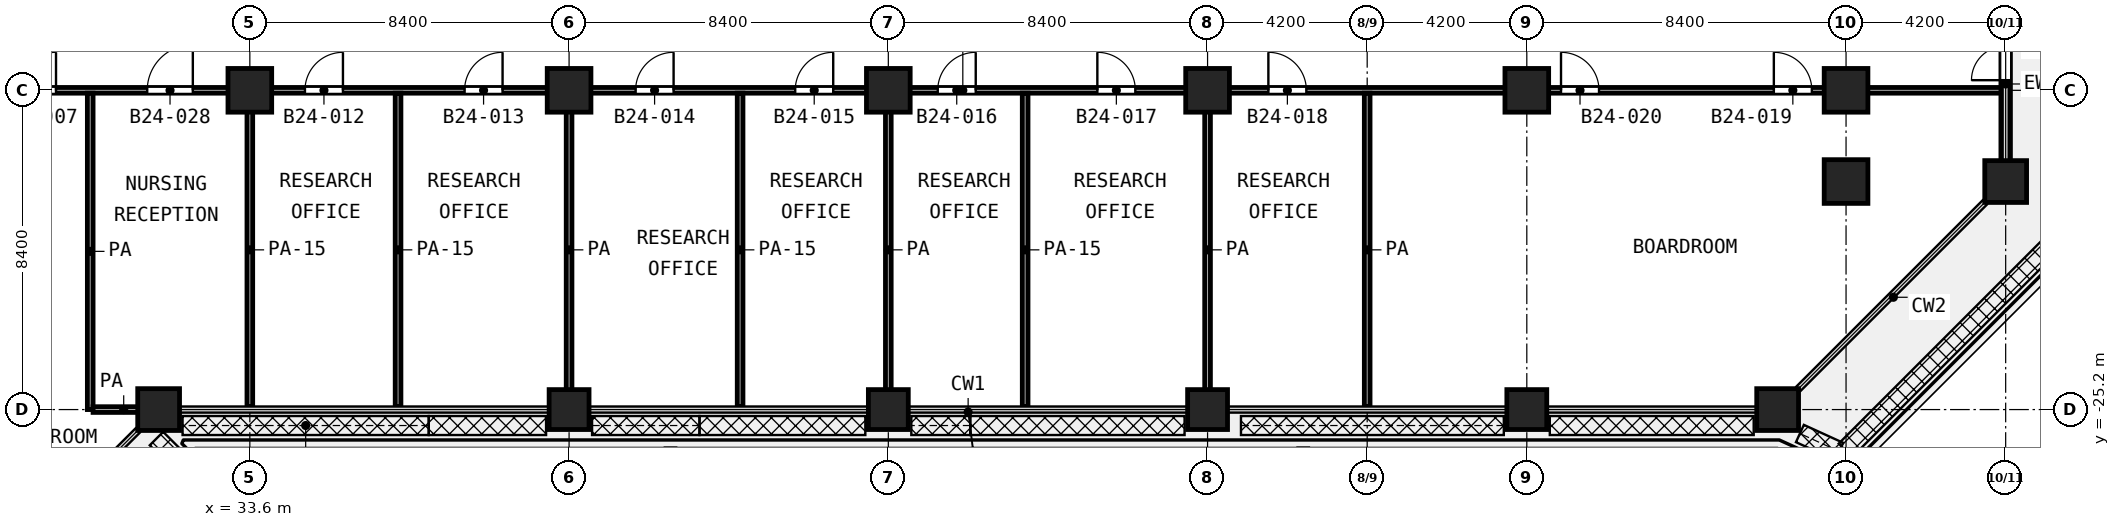
"""IFC4 building model, lengths in metres.
Left out: names, types, materials, properties, quantities, classifications, styles, units other than length and angle.
Written with IfcOpenShell. Run it as: python <this file> out.ifc"""

import sys

from ifc_helpers import new_model, si_unit, direction, frame, frame_2d, origin, origin_2d, place, context, subcontext, project, spatial, rectangle, extrude, element, fill, save


model = new_model("IFC4")
c1 = context("Model", 3, precision=1e-05, world=origin(), true_north=direction((0.0, 1.0)))
c2 = subcontext(c1, "Body", "Model", "MODEL_VIEW")
j1 = project(units=[si_unit("LENGTHUNIT", "METRE"), si_unit("PLANEANGLEUNIT", "RADIAN")], contexts=[c1])
p1 = place(None, origin())
s1 = spatial("IfcSite", under=j1, at=p1, CompositionType="ELEMENT")
p2 = place(p1, origin())
s2 = spatial("IfcBuilding", under=s1, at=p2, CompositionType="ELEMENT")
p3 = place(p2, frame((0.0, 0.0, 107.2)))
s3 = spatial("IfcBuildingStorey", under=s2, at=p3, CompositionType="ELEMENT", Elevation=107.2)
for number, where, z_axis, x_axis in (
    (1, (33.6, -16.8, 0.0), (0.0, 0.0, 1.0), (1.0, 0.0, 0.0)),
    (2, (42.0, -16.8, 0.0), (0.0, 0.0, 1.0), (1.0, 0.0, 0.0)),
    (3, (50.4, -16.8, 0.0), (0.0, 0.0, 1.0), (1.0, 0.0, 0.0)),
    (4, (58.8, -16.8, 0.0), (0.0, 0.0, 1.0), (1.0, 0.0, 0.0)),
    (5, (67.2, -16.8, 0.0), (0.0, 0.0, 1.0), (1.0, 0.0, 0.0)),
    (6, (75.6, -16.8, 0.0), (0.0, 0.0, 1.0), (1.0, 0.0, 0.0)),
    (7, (75.6, -19.2, 0.0), (0.0, 0.0, 1.0), (1.0, 0.0, 0.0)),
):
    element("IfcColumn", number, at=place(p3, frame(where, z_axis=z_axis, x_axis=x_axis)), inside=s3, PredefinedType="COLUMN", context=c2, shape_type="SweptSolid", body=[
        extrude(rectangle(XDim=1.15, YDim=1.15, at=origin_2d()), origin(), (0.0, 0.0, 1.0), 4.2),
    ])
for number, where, z_axis, x_axis in (
    (8, (79.8, -19.2, 0.0), (0.0, 0.0, 1.0), (1.0, 0.0, 0.0)),
    (9, (31.2, -25.2, 0.0), (0.0, 0.0, 1.0), (1.0, 0.0, 0.0)),
):
    element("IfcColumn", number, at=place(p3, frame(where, z_axis=z_axis, x_axis=x_axis)), inside=s3, PredefinedType="COLUMN", context=c2, shape_type="SweptSolid", body=[
        extrude(rectangle(XDim=1.1, YDim=1.1, at=origin_2d()), origin(), (0.0, 0.0, 1.0), 4.2),
    ])
for number, where, z_axis, x_axis in (
    (10, (42.0, -25.2, 0.0), (0.0, 0.0, 1.0), (1.0, 0.0, 0.0)),
    (11, (50.4, -25.2, 0.0), (0.0, 0.0, 1.0), (1.0, 0.0, 0.0)),
    (12, (58.8, -25.2, 0.0), (0.0, 0.0, 1.0), (1.0, 0.0, 0.0)),
    (13, (67.2, -25.2, 0.0), (0.0, 0.0, 1.0), (1.0, 0.0, 0.0)),
):
    element("IfcColumn", number, at=place(p3, frame(where, z_axis=z_axis, x_axis=x_axis)), inside=s3, PredefinedType="COLUMN", context=c2, shape_type="SweptSolid", body=[
        extrude(rectangle(XDim=1.05, YDim=1.05, at=origin_2d()), origin(), (0.0, 0.0, 1.0), 4.2),
    ])
p4 = place(p3, frame((73.8, -25.2, 0.0), z_axis=(0.0, 0.0, 1.0), x_axis=(1.0, 0.0, 0.0)))
e14 = element("IfcColumn", 14, at=p4, inside=s3, PredefinedType="COLUMN", context=c2, shape_type="SweptSolid", body=[
    extrude(rectangle(XDim=1.1, YDim=1.1, at=origin_2d()), origin(), (0.0, 0.0, 1.0), 4.2),
])
p5 = place(p3, frame((79.8, -18.65, 0.0), z_axis=(0.0, 0.0, 1.0), x_axis=(0.0, 1.0, 0.0)))
e15 = element("IfcWall", 15, at=p5, inside=s3, PredefinedType="SOLIDWALL", context=c2, shape_type="SweptSolid", body=[
    extrude(rectangle(XDim=4.033, YDim=0.25, at=frame_2d((2.017, 0.0))), origin(), (0.0, 0.0, 1.0), 3.48),
])
p6 = place(p5, frame((2.117, 0.0, 0.0)))
e16 = element("IfcOpeningElement", 16, at=p6, cuts=e15, PredefinedType="OPENING", context=c2, shape_type="SweptSolid", body=[
    extrude(rectangle(XDim=1.8, YDim=2.1, at=frame_2d((0.9, 1.05))), frame((0.0, 0.135, 0.0), z_axis=(0.0, -1.0, 0.0), x_axis=(1.0, 0.0, 0.0)), (0.0, 0.0, 1.0), 0.27),
])
p7 = place(p3, frame((29.475, -25.2, 0.0), z_axis=(0.0, 0.0, 1.0), x_axis=(1.0, 0.0, 0.0)))
e17 = element("IfcWall", 17, at=p7, inside=s3, PredefinedType="PARTITIONING", context=c2, shape_type="SweptSolid", body=[
    extrude(rectangle(XDim=1.612, YDim=0.15, at=frame_2d((0.806, 0.0))), origin(), (0.0, 0.0, 1.0), 3.6),
])
p8 = place(p3, frame((25.0, -16.8, 0.0), z_axis=(0.0, 0.0, 1.0), x_axis=(1.0, 0.0, 0.0)))
e18 = element("IfcWall", 18, at=p8, inside=s3, PredefinedType="PARTITIONING", context=c2, shape_type="SweptSolid", body=[
    extrude(rectangle(XDim=54.72, YDim=0.15, at=frame_2d((27.36, 0.0))), origin(), (0.0, 0.0, 1.0), 3.6),
])
p9 = place(p8, frame((2.5, 0.0, 0.0)))
e19 = element("IfcOpeningElement", 19, at=p9, cuts=e18, PredefinedType="OPENING", context=c2, shape_type="SweptSolid", body=[
    extrude(rectangle(XDim=1.0, YDim=2.1, at=frame_2d((0.5, 1.05))), frame((0.0, 0.085, 0.0), z_axis=(0.0, -1.0, 0.0), x_axis=(1.0, 0.0, 0.0)), (0.0, 0.0, 1.0), 0.17),
])
p10 = place(p8, frame((1.1, 0.0, 0.0)))
e20 = element("IfcOpeningElement", 20, at=p10, cuts=e18, PredefinedType="OPENING", context=c2, shape_type="SweptSolid", body=[
    extrude(rectangle(XDim=1.0, YDim=2.1, at=frame_2d((0.5, 1.05))), frame((0.0, 0.085, 0.0), z_axis=(0.0, -1.0, 0.0), x_axis=(1.0, 0.0, 0.0)), (0.0, 0.0, 1.0), 0.17),
])
p11 = place(p8, frame((5.9, 0.0, 0.0)))
e21 = element("IfcOpeningElement", 21, at=p11, cuts=e18, PredefinedType="OPENING", context=c2, shape_type="SweptSolid", body=[
    extrude(rectangle(XDim=1.2, YDim=2.1, at=frame_2d((0.6, 1.05))), frame((0.0, 0.085, 0.0), z_axis=(0.0, -1.0, 0.0), x_axis=(1.0, 0.0, 0.0)), (0.0, 0.0, 1.0), 0.17),
])
p12 = place(p8, frame((10.05, 0.0, 0.0)))
e22 = element("IfcOpeningElement", 22, at=p12, cuts=e18, PredefinedType="OPENING", context=c2, shape_type="SweptSolid", body=[
    extrude(rectangle(XDim=1.0, YDim=2.1, at=frame_2d((0.5, 1.05))), frame((0.0, 0.085, 0.0), z_axis=(0.0, -1.0, 0.0), x_axis=(1.0, 0.0, 0.0)), (0.0, 0.0, 1.0), 0.17),
])
p13 = place(p8, frame((14.25, 0.0, 0.0)))
e23 = element("IfcOpeningElement", 23, at=p13, cuts=e18, PredefinedType="OPENING", context=c2, shape_type="SweptSolid", body=[
    extrude(rectangle(XDim=1.0, YDim=2.1, at=frame_2d((0.5, 1.05))), frame((0.0, 0.085, 0.0), z_axis=(0.0, -1.0, 0.0), x_axis=(1.0, 0.0, 0.0)), (0.0, 0.0, 1.0), 0.17),
])
p14 = place(p8, frame((18.75, 0.0, 0.0)))
e24 = element("IfcOpeningElement", 24, at=p14, cuts=e18, PredefinedType="OPENING", context=c2, shape_type="SweptSolid", body=[
    extrude(rectangle(XDim=1.0, YDim=2.1, at=frame_2d((0.5, 1.05))), frame((0.0, 0.085, 0.0), z_axis=(0.0, -1.0, 0.0), x_axis=(1.0, 0.0, 0.0)), (0.0, 0.0, 1.0), 0.17),
])
p15 = place(p8, frame((22.95, 0.0, 0.0)))
e25 = element("IfcOpeningElement", 25, at=p15, cuts=e18, PredefinedType="OPENING", context=c2, shape_type="SweptSolid", body=[
    extrude(rectangle(XDim=1.0, YDim=2.1, at=frame_2d((0.5, 1.05))), frame((0.0, 0.085, 0.0), z_axis=(0.0, -1.0, 0.0), x_axis=(1.0, 0.0, 0.0)), (0.0, 0.0, 1.0), 0.17),
])
p16 = place(p8, frame((26.7, 0.0, 0.0)))
e26 = element("IfcOpeningElement", 26, at=p16, cuts=e18, PredefinedType="OPENING", context=c2, shape_type="SweptSolid", body=[
    extrude(rectangle(XDim=1.0, YDim=2.1, at=frame_2d((0.5, 1.05))), frame((0.0, 0.085, 0.0), z_axis=(0.0, -1.0, 0.0), x_axis=(1.0, 0.0, 0.0)), (0.0, 0.0, 1.0), 0.17),
])
p17 = place(p8, frame((30.9, 0.0, 0.0)))
e27 = element("IfcOpeningElement", 27, at=p17, cuts=e18, PredefinedType="OPENING", context=c2, shape_type="SweptSolid", body=[
    extrude(rectangle(XDim=1.0, YDim=2.1, at=frame_2d((0.5, 1.05))), frame((0.0, 0.085, 0.0), z_axis=(0.0, -1.0, 0.0), x_axis=(1.0, 0.0, 0.0)), (0.0, 0.0, 1.0), 0.17),
])
p18 = place(p8, frame((35.4, 0.0, 0.0)))
e28 = element("IfcOpeningElement", 28, at=p18, cuts=e18, PredefinedType="OPENING", context=c2, shape_type="SweptSolid", body=[
    extrude(rectangle(XDim=1.0, YDim=2.1, at=frame_2d((0.5, 1.05))), frame((0.0, 0.085, 0.0), z_axis=(0.0, -1.0, 0.0), x_axis=(1.0, 0.0, 0.0)), (0.0, 0.0, 1.0), 0.17),
])
p19 = place(p8, frame((48.7, 0.0, 0.0)))
e29 = element("IfcOpeningElement", 29, at=p19, cuts=e18, PredefinedType="OPENING", context=c2, shape_type="SweptSolid", body=[
    extrude(rectangle(XDim=1.0, YDim=2.1, at=frame_2d((0.5, 1.05))), frame((0.0, 0.085, 0.0), z_axis=(0.0, -1.0, 0.0), x_axis=(1.0, 0.0, 0.0)), (0.0, 0.0, 1.0), 0.17),
])
p20 = place(p8, frame((43.1, 0.0, 0.0)))
e30 = element("IfcOpeningElement", 30, at=p20, cuts=e18, PredefinedType="OPENING", context=c2, shape_type="SweptSolid", body=[
    extrude(rectangle(XDim=1.0, YDim=2.1, at=frame_2d((0.5, 1.05))), frame((0.0, 0.085, 0.0), z_axis=(0.0, -1.0, 0.0), x_axis=(1.0, 0.0, 0.0)), (0.0, 0.0, 1.0), 0.17),
])
p21 = place(p3, frame((29.4, -25.2, 0.0), z_axis=(0.0, 0.0, 1.0), x_axis=(0.0, 1.0, 0.0)))
e31 = element("IfcWall", 31, at=p21, inside=s3, PredefinedType="PARTITIONING", context=c2, shape_type="SweptSolid", body=[
    extrude(rectangle(XDim=8.325, YDim=0.15, at=frame_2d((4.163, 0.0))), origin(), (0.0, 0.0, 1.0), 3.6),
])
for number, where, z_axis, x_axis in (
    (32, (33.6, -25.12, 0.0), (0.0, 0.0, 1.0), (0.0, 1.0, 0.0)),
    (33, (37.5, -25.12, 0.0), (0.0, 0.0, 1.0), (0.0, 1.0, 0.0)),
):
    element("IfcWall", number, at=place(p3, frame(where, z_axis=z_axis, x_axis=x_axis)), inside=s3, PredefinedType="PARTITIONING", context=c2, shape_type="SweptSolid", body=[
        extrude(rectangle(XDim=8.245, YDim=0.15, at=frame_2d((4.123, 0.0))), origin(), (0.0, 0.0, 1.0), 2.7),
    ])
p22 = place(p3, frame((42.0, -25.12, 0.0), z_axis=(0.0, 0.0, 1.0), x_axis=(0.0, 1.0, 0.0)))
e34 = element("IfcWall", 34, at=p22, inside=s3, PredefinedType="PARTITIONING", context=c2, shape_type="SweptSolid", body=[
    extrude(rectangle(XDim=8.245, YDim=0.15, at=frame_2d((4.123, 0.0))), origin(), (0.0, 0.0, 1.0), 3.6),
])
p23 = place(p3, frame((46.5, -25.12, 0.0), z_axis=(0.0, 0.0, 1.0), x_axis=(0.0, 1.0, 0.0)))
e35 = element("IfcWall", 35, at=p23, inside=s3, PredefinedType="PARTITIONING", context=c2, shape_type="SweptSolid", body=[
    extrude(rectangle(XDim=8.245, YDim=0.15, at=frame_2d((4.123, 0.0))), origin(), (0.0, 0.0, 1.0), 2.7),
])
p24 = place(p3, frame((50.4, -25.12, 0.0), z_axis=(0.0, 0.0, 1.0), x_axis=(0.0, 1.0, 0.0)))
e36 = element("IfcWall", 36, at=p24, inside=s3, PredefinedType="PARTITIONING", context=c2, shape_type="SweptSolid", body=[
    extrude(rectangle(XDim=8.245, YDim=0.15, at=frame_2d((4.123, 0.0))), origin(), (0.0, 0.0, 1.0), 3.6),
])
p25 = place(p3, frame((54.0, -25.12, 0.0), z_axis=(0.0, 0.0, 1.0), x_axis=(0.0, 1.0, 0.0)))
e37 = element("IfcWall", 37, at=p25, inside=s3, PredefinedType="PARTITIONING", context=c2, shape_type="SweptSolid", body=[
    extrude(rectangle(XDim=8.245, YDim=0.15, at=frame_2d((4.123, 0.0))), origin(), (0.0, 0.0, 1.0), 2.7),
])
for number, where, z_axis, x_axis in (
    (38, (58.8, -25.12, 0.0), (0.0, 0.0, 1.0), (0.0, 1.0, 0.0)),
    (39, (63.0, -25.12, 0.0), (0.0, 0.0, 1.0), (0.0, 1.0, 0.0)),
):
    element("IfcWall", number, at=place(p3, frame(where, z_axis=z_axis, x_axis=x_axis)), inside=s3, PredefinedType="PARTITIONING", context=c2, shape_type="SweptSolid", body=[
        extrude(rectangle(XDim=8.245, YDim=0.15, at=frame_2d((4.123, 0.0))), origin(), (0.0, 0.0, 1.0), 3.6),
    ])
p26 = place(p6, origin())
e40 = element("IfcDoor", 40, at=p26, inside=s3, OperationType="DOUBLE_DOOR_SINGLE_SWING", PredefinedType="DOOR", context=c2, shape_type="SweptSolid", body=[
    extrude(rectangle(XDim=1.8, YDim=2.1, at=frame_2d((0.9, 1.05))), frame((0.0, 0.025, 0.0), z_axis=(0.0, -1.0, 0.0), x_axis=(1.0, 0.0, 0.0)), (0.0, 0.0, 1.0), 0.05),
])
fill(e16, e40)
p27 = place(p9, origin())
e41 = element("IfcDoor", 41, at=p27, inside=s3, OperationType="SINGLE_SWING_RIGHT", PredefinedType="DOOR", context=c2, shape_type="SweptSolid", body=[
    extrude(rectangle(XDim=1.0, YDim=2.1, at=frame_2d((0.5, 1.05))), frame((0.0, 0.025, 0.0), z_axis=(0.0, -1.0, 0.0), x_axis=(1.0, 0.0, 0.0)), (0.0, 0.0, 1.0), 0.05),
])
fill(e19, e41)
p28 = place(p11, origin())
e42 = element("IfcDoor", 42, at=p28, inside=s3, OperationType="SINGLE_SWING_RIGHT", PredefinedType="DOOR", context=c2, shape_type="SweptSolid", body=[
    extrude(rectangle(XDim=1.2, YDim=2.1, at=frame_2d((0.6, 1.05))), frame((0.0, 0.025, 0.0), z_axis=(0.0, -1.0, 0.0), x_axis=(1.0, 0.0, 0.0)), (0.0, 0.0, 1.0), 0.05),
])
fill(e21, e42)
p29 = place(p12, origin())
e43 = element("IfcDoor", 43, at=p29, inside=s3, OperationType="SINGLE_SWING_RIGHT", PredefinedType="DOOR", context=c2, shape_type="SweptSolid", body=[
    extrude(rectangle(XDim=1.0, YDim=2.1, at=frame_2d((0.5, 1.05))), frame((0.0, 0.025, 0.0), z_axis=(0.0, -1.0, 0.0), x_axis=(1.0, 0.0, 0.0)), (0.0, 0.0, 1.0), 0.05),
])
fill(e22, e43)
p30 = place(p13, origin())
e44 = element("IfcDoor", 44, at=p30, inside=s3, OperationType="SINGLE_SWING_RIGHT", PredefinedType="DOOR", context=c2, shape_type="SweptSolid", body=[
    extrude(rectangle(XDim=1.0, YDim=2.1, at=frame_2d((0.5, 1.05))), frame((0.0, 0.025, 0.0), z_axis=(0.0, -1.0, 0.0), x_axis=(1.0, 0.0, 0.0)), (0.0, 0.0, 1.0), 0.05),
])
fill(e23, e44)
p31 = place(p14, origin())
e45 = element("IfcDoor", 45, at=p31, inside=s3, OperationType="SINGLE_SWING_RIGHT", PredefinedType="DOOR", context=c2, shape_type="SweptSolid", body=[
    extrude(rectangle(XDim=1.0, YDim=2.1, at=frame_2d((0.5, 1.05))), frame((0.0, 0.025, 0.0), z_axis=(0.0, -1.0, 0.0), x_axis=(1.0, 0.0, 0.0)), (0.0, 0.0, 1.0), 0.05),
])
fill(e24, e45)
p32 = place(p15, origin())
e46 = element("IfcDoor", 46, at=p32, inside=s3, OperationType="SINGLE_SWING_RIGHT", PredefinedType="DOOR", context=c2, shape_type="SweptSolid", body=[
    extrude(rectangle(XDim=1.0, YDim=2.1, at=frame_2d((0.5, 1.05))), frame((0.0, 0.025, 0.0), z_axis=(0.0, -1.0, 0.0), x_axis=(1.0, 0.0, 0.0)), (0.0, 0.0, 1.0), 0.05),
])
fill(e25, e46)
p33 = place(p16, origin())
e47 = element("IfcDoor", 47, at=p33, inside=s3, OperationType="SINGLE_SWING_RIGHT", PredefinedType="DOOR", context=c2, shape_type="SweptSolid", body=[
    extrude(rectangle(XDim=1.0, YDim=2.1, at=frame_2d((0.5, 1.05))), frame((0.0, 0.025, 0.0), z_axis=(0.0, -1.0, 0.0), x_axis=(1.0, 0.0, 0.0)), (0.0, 0.0, 1.0), 0.05),
])
fill(e26, e47)
p34 = place(p17, origin())
e48 = element("IfcDoor", 48, at=p34, inside=s3, OperationType="SINGLE_SWING_LEFT", PredefinedType="DOOR", context=c2, shape_type="SweptSolid", body=[
    extrude(rectangle(XDim=1.0, YDim=2.1, at=frame_2d((0.5, 1.05))), frame((0.0, 0.025, 0.0), z_axis=(0.0, -1.0, 0.0), x_axis=(1.0, 0.0, 0.0)), (0.0, 0.0, 1.0), 0.05),
])
fill(e27, e48)
p35 = place(p18, origin())
e49 = element("IfcDoor", 49, at=p35, inside=s3, OperationType="SINGLE_SWING_LEFT", PredefinedType="DOOR", context=c2, shape_type="SweptSolid", body=[
    extrude(rectangle(XDim=1.0, YDim=2.1, at=frame_2d((0.5, 1.05))), frame((0.0, 0.025, 0.0), z_axis=(0.0, -1.0, 0.0), x_axis=(1.0, 0.0, 0.0)), (0.0, 0.0, 1.0), 0.05),
])
fill(e28, e49)
p36 = place(p19, origin())
e50 = element("IfcDoor", 50, at=p36, inside=s3, OperationType="SINGLE_SWING_LEFT", PredefinedType="DOOR", context=c2, shape_type="SweptSolid", body=[
    extrude(rectangle(XDim=1.0, YDim=2.1, at=frame_2d((0.5, 1.05))), frame((0.0, 0.025, 0.0), z_axis=(0.0, -1.0, 0.0), x_axis=(1.0, 0.0, 0.0)), (0.0, 0.0, 1.0), 0.05),
])
fill(e29, e50)
p37 = place(p20, origin())
e51 = element("IfcDoor", 51, at=p37, inside=s3, OperationType="SINGLE_SWING_LEFT", PredefinedType="DOOR", context=c2, shape_type="SweptSolid", body=[
    extrude(rectangle(XDim=1.0, YDim=2.1, at=frame_2d((0.5, 1.05))), frame((0.0, 0.025, 0.0), z_axis=(0.0, -1.0, 0.0), x_axis=(1.0, 0.0, 0.0)), (0.0, 0.0, 1.0), 0.05),
])
fill(e30, e51)
save(model, sys.argv[1])
